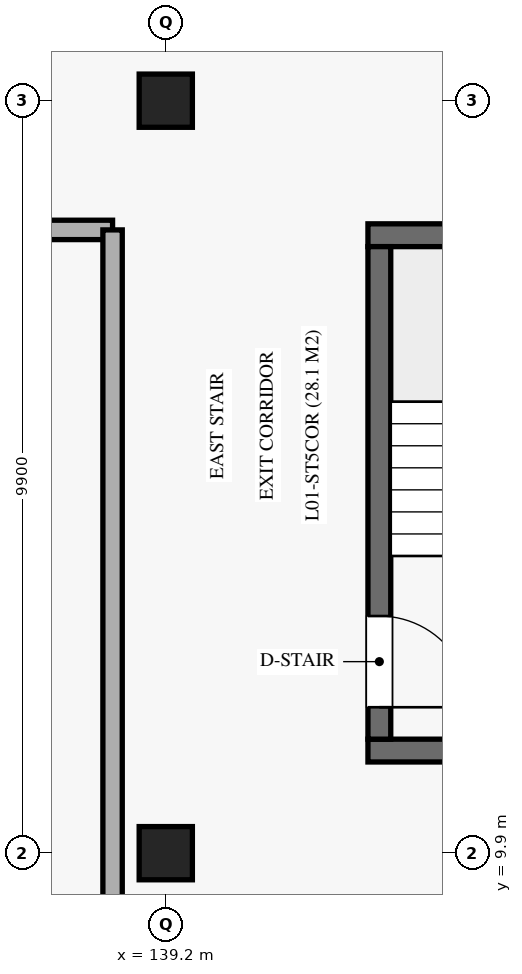
"""IFC4 building model, lengths in metres.
Left out: names, types, materials, properties, quantities, classifications, styles, units other than length and angle.
Written with IfcOpenShell. Run it as: python <this file> out.ifc"""

import sys

from ifc_helpers import new_model, si_unit, direction, frame, frame_2d, origin, origin_2d, place, context, subcontext, project, spatial, rectangle, extrude, element, fill, save


model = new_model("IFC4")
c1 = context("Model", 3, precision=1e-05, world=origin(), true_north=direction((0.0, 1.0)))
c2 = subcontext(c1, "Body", "Model", "MODEL_VIEW")
j1 = project(units=[si_unit("LENGTHUNIT", "METRE"), si_unit("PLANEANGLEUNIT", "RADIAN")], contexts=[c1])
p1 = place(None, origin())
s1 = spatial("IfcSite", under=j1, at=p1, CompositionType="ELEMENT")
p2 = place(p1, origin())
s2 = spatial("IfcBuilding", under=s1, at=p2, CompositionType="ELEMENT")
p3 = place(p2, frame((0.0, 0.0, 5.44)))
s3 = spatial("IfcBuildingStorey", under=s2, at=p3, CompositionType="ELEMENT", Elevation=5.44)
for number, where, z_axis, x_axis in (
    (1, (139.2, 9.9, 0.0), (0.0, 0.0, 1.0), (1.0, 0.0, 0.0)),
    (2, (139.2, 19.8, 0.0), (0.0, 0.0, 1.0), (1.0, 0.0, 0.0)),
):
    element("IfcColumn", number, at=place(p3, frame(where, z_axis=z_axis, x_axis=x_axis)), inside=s3, PredefinedType="COLUMN", context=c2, shape_type="SweptSolid", body=[
        extrude(rectangle(XDim=0.7, YDim=0.7, at=origin_2d()), origin(), (0.0, 0.0, 1.0), 5.44),
    ])
for number, where, z_axis, x_axis in (
    (3, (141.86, 11.25, 0.0), (0.0, 0.0, 1.0), (1.0, 0.0, 0.0)),
    (4, (141.86, 18.03, 0.0), (0.0, 0.0, 1.0), (1.0, 0.0, 0.0)),
):
    element("IfcWall", number, at=place(p3, frame(where, z_axis=z_axis, x_axis=x_axis)), inside=s3, PredefinedType="SHEAR", context=c2, shape_type="SweptSolid", body=[
        extrude(rectangle(XDim=7.08, YDim=0.3, at=frame_2d((3.54, 0.0))), origin(), (0.0, 0.0, 1.0), 5.18),
    ])
p4 = place(p3, frame((142.01, 11.4, 0.0), z_axis=(0.0, 0.0, 1.0), x_axis=(0.0, 1.0, 0.0)))
e5 = element("IfcWall", 5, at=p4, inside=s3, PredefinedType="SHEAR", context=c2, shape_type="SweptSolid", body=[
    extrude(rectangle(XDim=6.48, YDim=0.3, at=frame_2d((3.24, 0.0))), origin(), (0.0, 0.0, 1.0), 5.18),
])
p5 = place(p4, frame((0.42, 0.0, 0.0)))
e6 = element("IfcOpeningElement", 6, at=p5, cuts=e5, PredefinedType="OPENING", context=c2, shape_type="SweptSolid", body=[
    extrude(rectangle(XDim=1.2, YDim=2.2, at=frame_2d((0.6, 1.1))), frame((0.0, 0.16, 0.0), z_axis=(0.0, -1.0, 0.0), x_axis=(1.0, 0.0, 0.0)), (0.0, 0.0, 1.0), 0.32),
])
p6 = place(p3, frame((92.4, 18.1, 0.0), z_axis=(0.0, 0.0, 1.0), x_axis=(1.0, 0.0, 0.0)))
e7 = element("IfcWall", 7, at=p6, inside=s3, PredefinedType="SOLIDWALL", context=c2, shape_type="SweptSolid", body=[
    extrude(rectangle(XDim=46.1, YDim=0.255, at=frame_2d((23.05, 0.0))), origin(), (0.0, 0.0, 1.0), 4.3),
])
p7 = place(p6, frame((36.0, 0.0, 0.0)))
e8 = element("IfcOpeningElement", 8, at=p7, cuts=e7, PredefinedType="OPENING", context=c2, shape_type="SweptSolid", body=[
    extrude(rectangle(XDim=1.8, YDim=2.35, at=frame_2d((0.9, 1.175))), frame((0.0, 0.137, 0.0), z_axis=(0.0, -1.0, 0.0), x_axis=(1.0, 0.0, 0.0)), (0.0, 0.0, 1.0), 0.275),
])
p8 = place(p3, frame((138.5, 0.4, 0.0), z_axis=(0.0, 0.0, 1.0), x_axis=(0.0, 1.0, 0.0)))
e9 = element("IfcWall", 9, at=p8, inside=s3, PredefinedType="SOLIDWALL", context=c2, shape_type="SweptSolid", body=[
    extrude(rectangle(XDim=17.7, YDim=0.255, at=frame_2d((8.85, 0.0))), origin(), (0.0, 0.0, 1.0), 4.3),
])
p9 = place(p5, frame((1.2, 0.0, 0.0), z_axis=(0.0, 0.0, 1.0), x_axis=(-1.0, 0.0, 0.0)))
e10 = element("IfcDoor", 10, at=p9, inside=s3, OperationType="SINGLE_SWING_RIGHT", PredefinedType="DOOR", context=c2, shape_type="SweptSolid", body=[
    extrude(rectangle(XDim=1.2, YDim=2.2, at=frame_2d((0.6, 1.1))), frame((0.0, 0.025, 0.0), z_axis=(0.0, -1.0, 0.0), x_axis=(1.0, 0.0, 0.0)), (0.0, 0.0, 1.0), 0.05),
])
fill(e6, e10)
save(model, sys.argv[1])
